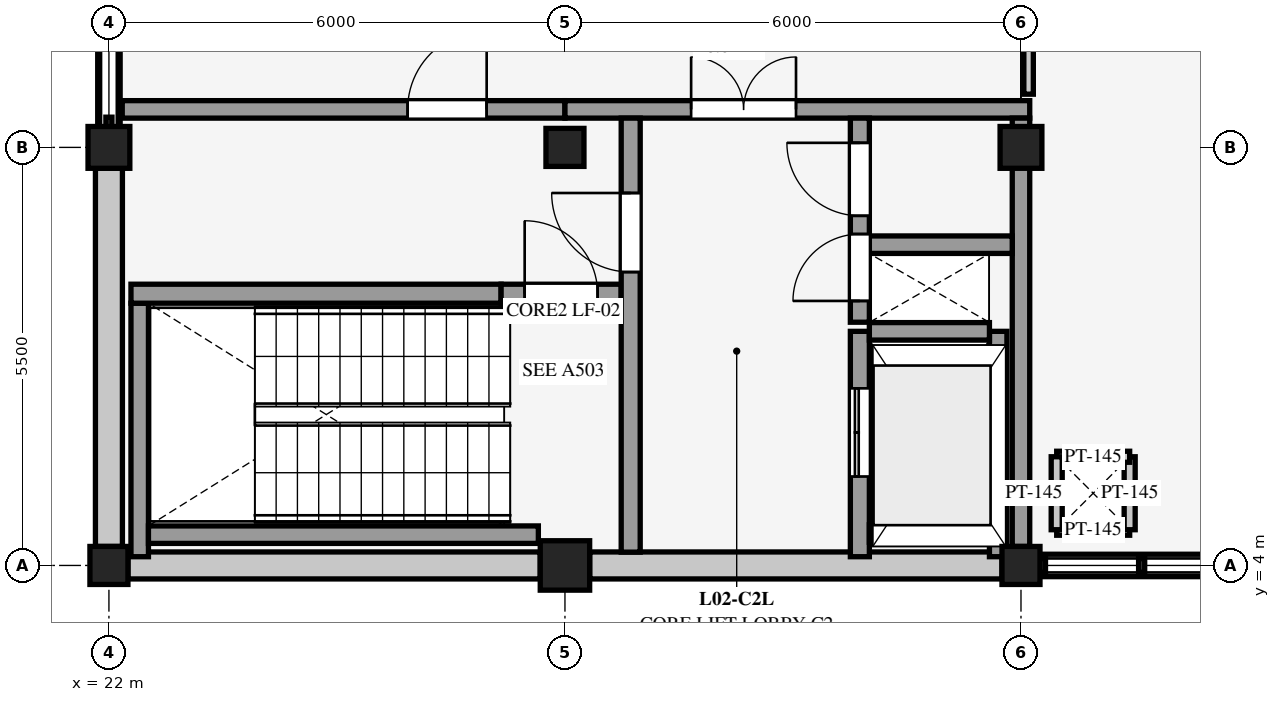
"""IFC4 building model, lengths in metres.
Left out: names, types, materials, properties, quantities, classifications, styles, units other than length and angle.
Written with IfcOpenShell. Run it as: python <this file> out.ifc"""

import sys

from ifc_helpers import new_model, si_unit, direction, frame, frame_2d, origin, origin_2d, place, context, subcontext, project, spatial, rectangle, extrude, element, fill, save


model = new_model("IFC4")
c1 = context("Model", 3, precision=1e-05, world=origin(), true_north=direction((0.0, 1.0)))
c2 = subcontext(c1, "Body", "Model", "MODEL_VIEW")
j1 = project(units=[si_unit("LENGTHUNIT", "METRE"), si_unit("PLANEANGLEUNIT", "RADIAN")], contexts=[c1])
p1 = place(None, origin())
s1 = spatial("IfcSite", under=j1, at=p1, CompositionType="ELEMENT")
p2 = place(p1, origin())
s2 = spatial("IfcBuilding", under=s1, at=p2, CompositionType="ELEMENT")
p3 = place(p2, frame((0.0, 0.0, 4.5)))
s3 = spatial("IfcBuildingStorey", under=s2, at=p3, CompositionType="ELEMENT", Elevation=4.5)
p4 = place(p3, frame((22.0, 4.0, 0.0), z_axis=(0.0, 0.0, 1.0), x_axis=(1.0, 0.0, 0.0)))
e1 = element("IfcColumn", 1, at=p4, inside=s3, PredefinedType="COLUMN", context=c2, shape_type="SweptSolid", body=[
    extrude(rectangle(XDim=0.5, YDim=0.5, at=origin_2d()), origin(), (0.0, 0.0, 1.0), 4.5),
])
p5 = place(p3, frame((22.0, 9.5, 0.0), z_axis=(0.0, 0.0, 1.0), x_axis=(1.0, 0.0, 0.0)))
e2 = element("IfcColumn", 2, at=p5, inside=s3, PredefinedType="COLUMN", context=c2, shape_type="SweptSolid", body=[
    extrude(rectangle(XDim=0.55, YDim=0.55, at=origin_2d()), origin(), (0.0, 0.0, 1.0), 4.5),
])
p6 = place(p3, frame((28.0, 4.0, 0.0), z_axis=(0.0, 0.0, 1.0), x_axis=(1.0, 0.0, 0.0)))
e3 = element("IfcColumn", 3, at=p6, inside=s3, PredefinedType="COLUMN", context=c2, shape_type="SweptSolid", body=[
    extrude(rectangle(XDim=0.65, YDim=0.65, at=origin_2d()), origin(), (0.0, 0.0, 1.0), 4.5),
])
for number, where, z_axis, x_axis in (
    (4, (28.0, 9.5, 0.0), (0.0, 0.0, 1.0), (1.0, 0.0, 0.0)),
    (5, (34.0, 4.0, 0.0), (0.0, 0.0, 1.0), (1.0, 0.0, 0.0)),
):
    element("IfcColumn", number, at=place(p3, frame(where, z_axis=z_axis, x_axis=x_axis)), inside=s3, PredefinedType="COLUMN", context=c2, shape_type="SweptSolid", body=[
        extrude(rectangle(XDim=0.5, YDim=0.5, at=origin_2d()), origin(), (0.0, 0.0, 1.0), 4.5),
    ])
p7 = place(p3, frame((34.0, 9.5, 0.0), z_axis=(0.0, 0.0, 1.0), x_axis=(1.0, 0.0, 0.0)))
e6 = element("IfcColumn", 6, at=p7, inside=s3, PredefinedType="COLUMN", context=c2, shape_type="SweptSolid", body=[
    extrude(rectangle(XDim=0.55, YDim=0.55, at=origin_2d()), origin(), (0.0, 0.0, 1.0), 4.5),
])
for number, where, z_axis, x_axis in (
    (7, (27.675, 4.0, 0.0), (0.0, 0.0, 1.0), (-1.0, 0.0, 0.0)),
    (8, (33.75, 4.0, 0.0), (0.0, 0.0, 1.0), (-1.0, 0.0, 0.0)),
):
    element("IfcWall", number, at=place(p3, frame(where, z_axis=z_axis, x_axis=x_axis)), inside=s3, PredefinedType="SOLIDWALL", context=c2, shape_type="SweptSolid", body=[
        extrude(rectangle(XDim=5.425, YDim=0.355, at=frame_2d((2.712, 0.0))), origin(), (0.0, 0.0, 1.0), 3.809),
    ])
p8 = place(p3, frame((39.6, 4.0, 0.0), z_axis=(0.0, 0.0, 1.0), x_axis=(-1.0, 0.0, 0.0)))
e9 = element("IfcWall", 9, at=p8, inside=s3, PredefinedType="SOLIDWALL", context=c2, shape_type="SweptSolid", body=[
    extrude(rectangle(XDim=5.35, YDim=0.295, at=frame_2d((2.675, 0.0))), origin(), (0.0, 0.0, 1.0), 0.36),
])
p9 = place(p3, frame((22.0, 4.25, 0.0), z_axis=(0.0, 0.0, 1.0), x_axis=(0.0, 1.0, 0.0)))
e10 = element("IfcWall", 10, at=p9, inside=s3, PredefinedType="SOLIDWALL", context=c2, shape_type="SweptSolid", body=[
    extrude(rectangle(XDim=4.975, YDim=0.355, at=frame_2d((2.488, 0.0))), origin(), (0.0, 0.0, 1.0), 3.809),
])
p10 = place(p3, frame((22.0, 9.775, 0.0), z_axis=(0.0, 0.0, 1.0), x_axis=(0.0, 1.0, 0.0)))
e11 = element("IfcWall", 11, at=p10, inside=s3, PredefinedType="SOLIDWALL", context=c2, shape_type="SweptSolid", body=[
    extrude(rectangle(XDim=4.925, YDim=0.295, at=frame_2d((2.462, 0.0))), origin(), (0.0, 0.0, 1.0), 0.16),
])
for number, where, z_axis, x_axis in (
    (12, (34.47, 4.47, 0.0), (0.0, 0.0, 1.0), (1.0, 0.0, 0.0)),
    (13, (35.43, 4.47, 0.0), (0.0, 0.0, 1.0), (0.0, 1.0, 0.0)),
    (14, (35.43, 5.43, 0.0), (0.0, 0.0, 1.0), (-1.0, 0.0, 0.0)),
    (15, (34.47, 5.43, 0.0), (0.0, 0.0, 1.0), (0.0, -1.0, 0.0)),
):
    element("IfcWall", number, at=place(p3, frame(where, z_axis=z_axis, x_axis=x_axis)), inside=s3, PredefinedType="PARTITIONING", context=c2, shape_type="SweptSolid", body=[
        extrude(rectangle(XDim=0.96, YDim=0.145, at=frame_2d((0.48, 0.0))), origin(), (0.0, 0.0, 1.0), 4.216),
    ])
p11 = place(p3, frame((22.175, 10.0, 0.0), z_axis=(0.0, 0.0, 1.0), x_axis=(1.0, 0.0, 0.0)))
e16 = element("IfcWall", 16, at=p11, inside=s3, PredefinedType="SHEAR", context=c2, shape_type="SweptSolid", body=[
    extrude(rectangle(XDim=5.825, YDim=0.23, at=frame_2d((2.913, 0.0))), origin(), (0.0, 0.0, 1.0), 4.216),
])
p12 = place(p11, frame((3.755, 0.0, 0.0)))
e17 = element("IfcOpeningElement", 17, at=p12, cuts=e16, PredefinedType="OPENING", context=c2, shape_type="SweptSolid", body=[
    extrude(rectangle(XDim=1.04, YDim=2.14, at=frame_2d((0.52, 1.07))), frame((0.0, 0.125, 0.0), z_axis=(0.0, -1.0, 0.0), x_axis=(1.0, 0.0, 0.0)), (0.0, 0.0, 1.0), 0.25),
])
p13 = place(p3, frame((28.0, 10.0, 0.0), z_axis=(0.0, 0.0, 1.0), x_axis=(1.0, 0.0, 0.0)))
e18 = element("IfcWall", 18, at=p13, inside=s3, PredefinedType="SHEAR", context=c2, shape_type="SweptSolid", body=[
    extrude(rectangle(XDim=6.115, YDim=0.23, at=frame_2d((3.058, 0.0))), origin(), (0.0, 0.0, 1.0), 4.216),
])
p14 = place(p13, frame((1.66, 0.0, 0.0)))
e19 = element("IfcOpeningElement", 19, at=p14, cuts=e18, PredefinedType="OPENING", context=c2, shape_type="SweptSolid", body=[
    extrude(rectangle(XDim=1.38, YDim=2.16, at=frame_2d((0.69, 1.08))), frame((0.0, 0.125, 0.0), z_axis=(0.0, -1.0, 0.0), x_axis=(1.0, 0.0, 0.0)), (0.0, 0.0, 1.0), 0.25),
])
p15 = place(p3, frame((34.0, 4.25, 0.0), z_axis=(0.0, 0.0, 1.0), x_axis=(0.0, 1.0, 0.0)))
e20 = element("IfcWall", 20, at=p15, inside=s3, PredefinedType="SHEAR", context=c2, shape_type="SweptSolid", body=[
    extrude(rectangle(XDim=5.635, YDim=0.23, at=frame_2d((2.817, 0.0))), origin(), (0.0, 0.0, 1.0), 4.216),
])
p16 = place(p3, frame((22.405, 4.115, 0.0), z_axis=(0.0, 0.0, 1.0), x_axis=(0.0, 1.0, 0.0)))
e21 = element("IfcWall", 21, at=p16, inside=s3, PredefinedType="SHEAR", context=c2, shape_type="SweptSolid", body=[
    extrude(rectangle(XDim=3.335, YDim=0.23, at=frame_2d((1.667, 0.0))), origin(), (0.0, 0.0, 1.0), 4.5),
])
p17 = place(p3, frame((22.52, 4.405, 0.0), z_axis=(0.0, 0.0, 1.0), x_axis=(1.0, 0.0, 0.0)))
e22 = element("IfcWall", 22, at=p17, inside=s3, PredefinedType="SHEAR", context=c2, shape_type="SweptSolid", body=[
    extrude(rectangle(XDim=5.13, YDim=0.23, at=frame_2d((2.565, 0.0))), origin(), (0.0, 0.0, 1.0), 4.5),
])
p18 = place(p3, frame((22.29, 7.575, 0.0), z_axis=(0.0, 0.0, 1.0), x_axis=(1.0, 0.0, 0.0)))
e23 = element("IfcWall", 23, at=p18, inside=s3, PredefinedType="SHEAR", context=c2, shape_type="SweptSolid", body=[
    extrude(rectangle(XDim=4.87, YDim=0.25, at=frame_2d((2.435, 0.0))), origin(), (0.0, 0.0, 1.0), 4.5),
])
p19 = place(p3, frame((27.16, 7.575, 0.0), z_axis=(0.0, 0.0, 1.0), x_axis=(1.0, 0.0, 0.0)))
e24 = element("IfcWall", 24, at=p19, inside=s3, PredefinedType="SHEAR", context=c2, shape_type="SweptSolid", body=[
    extrude(rectangle(XDim=1.58, YDim=0.25, at=frame_2d((0.79, 0.0))), origin(), (0.0, 0.0, 1.0), 4.216),
])
p20 = place(p19, frame((0.31, 0.0, 0.0)))
e25 = element("IfcOpeningElement", 25, at=p20, cuts=e24, PredefinedType="OPENING", context=c2, shape_type="SweptSolid", body=[
    extrude(rectangle(XDim=0.96, YDim=2.12, at=frame_2d((0.48, 1.06))), frame((0.0, 0.135, 0.0), z_axis=(0.0, -1.0, 0.0), x_axis=(1.0, 0.0, 0.0)), (0.0, 0.0, 1.0), 0.27),
])
p21 = place(p3, frame((28.865, 4.175, 0.0), z_axis=(0.0, 0.0, 1.0), x_axis=(0.0, 1.0, 0.0)))
e26 = element("IfcWall", 26, at=p21, inside=s3, PredefinedType="SHEAR", context=c2, shape_type="SweptSolid", body=[
    extrude(rectangle(XDim=5.71, YDim=0.25, at=frame_2d((2.855, 0.0))), origin(), (0.0, 0.0, 1.0), 4.216),
])
p22 = place(p21, frame((3.685, 0.0, 0.0)))
e27 = element("IfcOpeningElement", 27, at=p22, cuts=e26, PredefinedType="OPENING", context=c2, shape_type="SweptSolid", body=[
    extrude(rectangle(XDim=1.04, YDim=2.14, at=frame_2d((0.52, 1.07))), frame((0.0, 0.135, 0.0), z_axis=(0.0, -1.0, 0.0), x_axis=(1.0, 0.0, 0.0)), (0.0, 0.0, 1.0), 0.27),
])
p23 = place(p3, frame((31.88, 4.115, 0.0), z_axis=(0.0, 0.0, 1.0), x_axis=(0.0, 1.0, 0.0)))
e28 = element("IfcWall", 28, at=p23, inside=s3, PredefinedType="SHEAR", context=c2, shape_type="SweptSolid", body=[
    extrude(rectangle(XDim=2.965, YDim=0.25, at=frame_2d((1.482, 0.0))), origin(), (0.0, 0.0, 1.0), 4.5),
])
p24 = place(p23, frame((1.055, 0.0, 0.0)))
e29 = element("IfcOpeningElement", 29, at=p24, cuts=e28, PredefinedType="OPENING", context=c2, shape_type="SweptSolid", body=[
    extrude(rectangle(XDim=1.16, YDim=2.18, at=frame_2d((0.58, 1.09))), frame((0.0, 0.135, 0.0), z_axis=(0.0, -1.0, 0.0), x_axis=(1.0, 0.0, 0.0)), (0.0, 0.0, 1.0), 0.27),
])
p25 = place(p3, frame((32.005, 4.42, 0.0), z_axis=(0.0, 0.0, 1.0), x_axis=(1.0, 0.0, 0.0)))
e30 = element("IfcWall", 30, at=p25, inside=s3, PredefinedType="SHEAR", context=c2, shape_type="SweptSolid", body=[
    extrude(rectangle(XDim=1.58, YDim=0.23, at=frame_2d((0.79, 0.0))), origin(), (0.0, 0.0, 1.0), 4.5),
])
p26 = place(p3, frame((33.7, 4.115, 0.0), z_axis=(0.0, 0.0, 1.0), x_axis=(0.0, 1.0, 0.0)))
e31 = element("IfcWall", 31, at=p26, inside=s3, PredefinedType="SHEAR", context=c2, shape_type="SweptSolid", body=[
    extrude(rectangle(XDim=2.965, YDim=0.23, at=frame_2d((1.482, 0.0))), origin(), (0.0, 0.0, 1.0), 4.5),
])
p27 = place(p3, frame((32.005, 7.08, 0.0), z_axis=(0.0, 0.0, 1.0), x_axis=(1.0, 0.0, 0.0)))
e32 = element("IfcWall", 32, at=p27, inside=s3, PredefinedType="SHEAR", context=c2, shape_type="SweptSolid", body=[
    extrude(rectangle(XDim=1.58, YDim=0.23, at=frame_2d((0.79, 0.0))), origin(), (0.0, 0.0, 1.0), 4.5),
])
p28 = place(p3, frame((31.88, 7.2, 0.0), z_axis=(0.0, 0.0, 1.0), x_axis=(0.0, 1.0, 0.0)))
e33 = element("IfcWall", 33, at=p28, inside=s3, PredefinedType="SHEAR", context=c2, shape_type="SweptSolid", body=[
    extrude(rectangle(XDim=2.685, YDim=0.25, at=frame_2d((1.343, 0.0))), origin(), (0.0, 0.0, 1.0), 4.216),
])
p29 = place(p28, frame((0.28, 0.0, 0.0)))
e34 = element("IfcOpeningElement", 34, at=p29, cuts=e33, PredefinedType="OPENING", context=c2, shape_type="SweptSolid", body=[
    extrude(rectangle(XDim=0.88, YDim=2.08, at=frame_2d((0.44, 1.04))), frame((0.0, 0.135, 0.0), z_axis=(0.0, -1.0, 0.0), x_axis=(1.0, 0.0, 0.0)), (0.0, 0.0, 1.0), 0.27),
])
p30 = place(p28, frame((1.4, 0.0, 0.0)))
e35 = element("IfcOpeningElement", 35, at=p30, cuts=e33, PredefinedType="OPENING", context=c2, shape_type="SweptSolid", body=[
    extrude(rectangle(XDim=0.96, YDim=2.12, at=frame_2d((0.48, 1.06))), frame((0.0, 0.135, 0.0), z_axis=(0.0, -1.0, 0.0), x_axis=(1.0, 0.0, 0.0)), (0.0, 0.0, 1.0), 0.27),
])
p31 = place(p3, frame((32.005, 8.22, 0.0), z_axis=(0.0, 0.0, 1.0), x_axis=(1.0, 0.0, 0.0)))
e36 = element("IfcWall", 36, at=p31, inside=s3, PredefinedType="SHEAR", context=c2, shape_type="SweptSolid", body=[
    extrude(rectangle(XDim=1.88, YDim=0.23, at=frame_2d((0.94, 0.0))), origin(), (0.0, 0.0, 1.0), 4.216),
])
p32 = place(p3, frame((34.1, 10.2, 0.0), z_axis=(0.0, 0.0, 1.0), x_axis=(0.0, 1.0, 0.0)))
e37 = element("IfcWall", 37, at=p32, inside=s3, PredefinedType="PARTITIONING", context=c2, shape_type="SweptSolid", body=[
    extrude(rectangle(XDim=2.2, YDim=0.125, at=frame_2d((1.1, 0.0))), origin(), (0.0, 0.0, 1.0), 4.216),
])
p33 = place(p32, frame((0.65, 0.0, 0.0)))
e38 = element("IfcOpeningElement", 38, at=p33, cuts=e37, PredefinedType="OPENING", context=c2, shape_type="SweptSolid", body=[
    extrude(rectangle(XDim=0.9, YDim=2.1, at=frame_2d((0.45, 1.05))), frame((0.0, 0.073, 0.0), z_axis=(0.0, -1.0, 0.0), x_axis=(1.0, 0.0, 0.0)), (0.0, 0.0, 1.0), 0.145),
])
p34 = place(p12, origin())
e39 = element("IfcDoor", 39, at=p34, inside=s3, OperationType="SINGLE_SWING_RIGHT", PredefinedType="DOOR", context=c2, shape_type="SweptSolid", body=[
    extrude(rectangle(XDim=1.04, YDim=2.14, at=frame_2d((0.52, 1.07))), frame((0.0, 0.025, 0.0), z_axis=(0.0, -1.0, 0.0), x_axis=(1.0, 0.0, 0.0)), (0.0, 0.0, 1.0), 0.05),
])
fill(e17, e39)
p35 = place(p14, origin())
e40 = element("IfcDoor", 40, at=p35, inside=s3, OperationType="DOUBLE_DOOR_SINGLE_SWING", PredefinedType="DOOR", context=c2, shape_type="SweptSolid", body=[
    extrude(rectangle(XDim=1.38, YDim=2.16, at=frame_2d((0.69, 1.08))), frame((0.0, 0.025, 0.0), z_axis=(0.0, -1.0, 0.0), x_axis=(1.0, 0.0, 0.0)), (0.0, 0.0, 1.0), 0.05),
])
fill(e19, e40)
p36 = place(p20, origin())
e41 = element("IfcDoor", 41, at=p36, inside=s3, OperationType="SINGLE_SWING_LEFT", PredefinedType="DOOR", context=c2, shape_type="SweptSolid", body=[
    extrude(rectangle(XDim=0.96, YDim=2.12, at=frame_2d((0.48, 1.06))), frame((0.0, 0.025, 0.0), z_axis=(0.0, -1.0, 0.0), x_axis=(1.0, 0.0, 0.0)), (0.0, 0.0, 1.0), 0.05),
])
fill(e25, e41)
p37 = place(p22, origin())
e42 = element("IfcDoor", 42, at=p37, inside=s3, OperationType="SINGLE_SWING_RIGHT", PredefinedType="DOOR", context=c2, shape_type="SweptSolid", body=[
    extrude(rectangle(XDim=1.04, YDim=2.14, at=frame_2d((0.52, 1.07))), frame((0.0, 0.025, 0.0), z_axis=(0.0, -1.0, 0.0), x_axis=(1.0, 0.0, 0.0)), (0.0, 0.0, 1.0), 0.05),
])
fill(e27, e42)
p38 = place(p24, origin())
e43 = element("IfcDoor", 43, at=p38, inside=s3, OperationType="DOUBLE_DOOR_SLIDING", PredefinedType="DOOR", context=c2, shape_type="SweptSolid", body=[
    extrude(rectangle(XDim=1.16, YDim=2.18, at=frame_2d((0.58, 1.09))), frame((0.0, 0.025, 0.0), z_axis=(0.0, -1.0, 0.0), x_axis=(1.0, 0.0, 0.0)), (0.0, 0.0, 1.0), 0.05),
])
fill(e29, e43)
p39 = place(p29, origin())
e44 = element("IfcDoor", 44, at=p39, inside=s3, OperationType="SINGLE_SWING_LEFT", PredefinedType="DOOR", context=c2, shape_type="SweptSolid", body=[
    extrude(rectangle(XDim=0.88, YDim=2.08, at=frame_2d((0.44, 1.04))), frame((0.0, 0.025, 0.0), z_axis=(0.0, -1.0, 0.0), x_axis=(1.0, 0.0, 0.0)), (0.0, 0.0, 1.0), 0.05),
])
fill(e34, e44)
p40 = place(p30, origin())
e45 = element("IfcDoor", 45, at=p40, inside=s3, OperationType="SINGLE_SWING_RIGHT", PredefinedType="DOOR", context=c2, shape_type="SweptSolid", body=[
    extrude(rectangle(XDim=0.96, YDim=2.12, at=frame_2d((0.48, 1.06))), frame((0.0, 0.025, 0.0), z_axis=(0.0, -1.0, 0.0), x_axis=(1.0, 0.0, 0.0)), (0.0, 0.0, 1.0), 0.05),
])
fill(e35, e45)
save(model, sys.argv[1])
